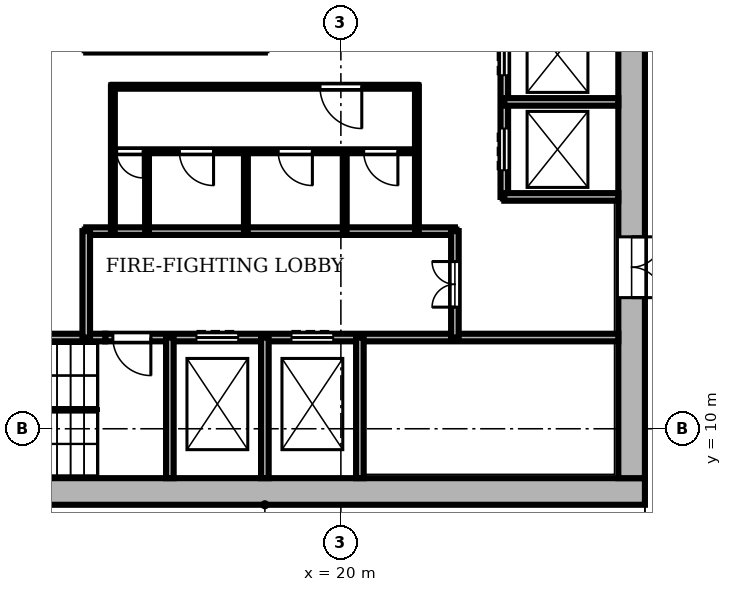
"""IFC4 building model, lengths in metres.
Left out: names, types, materials, properties, quantities, classifications, styles, units other than length and angle.
Written with IfcOpenShell. Run it as: python <this file> out.ifc"""

import sys

from ifc_helpers import new_model, si_unit, direction, frame, frame_2d, origin, place, context, subcontext, project, spatial, rectangle, extrude, element, fill, save


model = new_model("IFC4")
c1 = context("Model", 3, precision=1e-05, world=origin(), true_north=direction((0.0, 1.0)))
c2 = subcontext(c1, "Body", "Model", "MODEL_VIEW")
j1 = project(units=[si_unit("LENGTHUNIT", "METRE"), si_unit("PLANEANGLEUNIT", "RADIAN")], contexts=[c1])
p1 = place(None, origin())
s1 = spatial("IfcSite", under=j1, at=p1, CompositionType="ELEMENT")
p2 = place(p1, origin())
s2 = spatial("IfcBuilding", under=s1, at=p2, CompositionType="ELEMENT")
p3 = place(p2, frame((0.0, 0.0, 126.3)))
s3 = spatial("IfcBuildingStorey", under=s2, at=p3, CompositionType="ELEMENT", Elevation=126.3)
p4 = place(p3, frame((8.0, 8.35, 0.0), z_axis=(0.0, 0.0, 1.0), x_axis=(1.0, 0.0, 0.0)))
e1 = element("IfcWall", 1, at=p4, inside=s3, PredefinedType="SHEAR", context=c2, shape_type="SweptSolid", body=[
    extrude(rectangle(XDim=20.0, YDim=0.7, at=frame_2d((10.0, 0.0))), origin(), (0.0, 0.0, 1.0), 5.4),
])
p5 = place(p3, frame((27.65, 8.7, 0.0), z_axis=(0.0, 0.0, 1.0), x_axis=(0.0, 1.0, 0.0)))
e2 = element("IfcWall", 2, at=p5, inside=s3, PredefinedType="SHEAR", context=c2, shape_type="SweptSolid", body=[
    extrude(rectangle(XDim=18.6, YDim=0.7, at=frame_2d((9.3, 0.0))), origin(), (0.0, 0.0, 1.0), 5.4),
])
p6 = place(p5, frame((4.75, 0.0, 0.0)))
e3 = element("IfcOpeningElement", 3, at=p6, cuts=e2, PredefinedType="OPENING", context=c2, shape_type="SweptSolid", body=[
    extrude(rectangle(XDim=1.6, YDim=2.1, at=frame_2d((0.8, 1.05))), frame((0.0, 0.36, 0.0), z_axis=(0.0, -1.0, 0.0), x_axis=(1.0, 0.0, 0.0)), (0.0, 0.0, 1.0), 0.72),
])
p7 = place(p3, frame((8.7, 12.4, 0.0), z_axis=(0.0, 0.0, 1.0), x_axis=(1.0, 0.0, 0.0)))
e4 = element("IfcWall", 4, at=p7, inside=s3, PredefinedType="SHEAR", context=c2, shape_type="SweptSolid", body=[
    extrude(rectangle(XDim=5.1, YDim=0.2, at=frame_2d((2.55, 0.0))), origin(), (0.0, 0.0, 1.0), 5.08),
])
p8 = place(p3, frame((13.8, 12.4, 0.0), z_axis=(0.0, 0.0, 1.0), x_axis=(1.0, 0.0, 0.0)))
e5 = element("IfcWall", 5, at=p8, inside=s3, PredefinedType="SHEAR", context=c2, shape_type="SweptSolid", body=[
    extrude(rectangle(XDim=13.5, YDim=0.2, at=frame_2d((6.75, 0.0))), origin(), (0.0, 0.0, 1.0), 5.08),
])
p9 = place(p8, frame((2.4, 0.0, 0.0)))
e6 = element("IfcOpeningElement", 6, at=p9, cuts=e5, PredefinedType="OPENING", context=c2, shape_type="SweptSolid", body=[
    extrude(rectangle(XDim=1.1, YDim=2.1, at=frame_2d((0.55, 1.05))), frame((0.0, 0.11, 0.0), z_axis=(0.0, -1.0, 0.0), x_axis=(1.0, 0.0, 0.0)), (0.0, 0.0, 1.0), 0.22),
])
p10 = place(p8, frame((4.9, 0.0, 0.0)))
e7 = element("IfcOpeningElement", 7, at=p10, cuts=e5, PredefinedType="OPENING", context=c2, shape_type="SweptSolid", body=[
    extrude(rectangle(XDim=1.1, YDim=2.1, at=frame_2d((0.55, 1.05))), frame((0.0, 0.11, 0.0), z_axis=(0.0, -1.0, 0.0), x_axis=(1.0, 0.0, 0.0)), (0.0, 0.0, 1.0), 0.22),
])
p11 = place(p8, frame((0.2, 0.0, 0.0)))
e8 = element("IfcOpeningElement", 8, at=p11, cuts=e5, PredefinedType="OPENING", context=c2, shape_type="SweptSolid", body=[
    extrude(rectangle(XDim=1.0, YDim=2.1, at=frame_2d((0.5, 1.05))), frame((0.0, 0.11, 0.0), z_axis=(0.0, -1.0, 0.0), x_axis=(1.0, 0.0, 0.0)), (0.0, 0.0, 1.0), 0.22),
])
p12 = place(p3, frame((13.3, 15.2, 0.0), z_axis=(0.0, 0.0, 1.0), x_axis=(1.0, 0.0, 0.0)))
e9 = element("IfcWall", 9, at=p12, inside=s3, PredefinedType="SHEAR", context=c2, shape_type="SweptSolid", body=[
    extrude(rectangle(XDim=9.7, YDim=0.2, at=frame_2d((4.85, 0.0))), origin(), (0.0, 0.0, 1.0), 5.08),
])
p13 = place(p3, frame((24.3, 16.1, 0.0), z_axis=(0.0, 0.0, 1.0), x_axis=(1.0, 0.0, 0.0)))
e10 = element("IfcWall", 10, at=p13, inside=s3, PredefinedType="SHEAR", context=c2, shape_type="SweptSolid", body=[
    extrude(rectangle(XDim=3.0, YDim=0.2, at=frame_2d((1.5, 0.0))), origin(), (0.0, 0.0, 1.0), 5.08),
])
p14 = place(p3, frame((14.0, 17.3, 0.0), z_axis=(0.0, 0.0, 1.0), x_axis=(1.0, 0.0, 0.0)))
e11 = element("IfcWall", 11, at=p14, inside=s3, PredefinedType="PARTITIONING", context=c2, shape_type="SweptSolid", body=[
    extrude(rectangle(XDim=8.0, YDim=0.1, at=frame_2d((4.0, 0.0))), origin(), (0.0, 0.0, 1.0), 5.08),
])
p15 = place(p14, frame((0.1, 0.0, 0.0)))
e12 = element("IfcOpeningElement", 12, at=p15, cuts=e11, PredefinedType="OPENING", context=c2, shape_type="SweptSolid", body=[
    extrude(rectangle(XDim=0.7, YDim=2.1, at=frame_2d((0.35, 1.05))), frame((0.0, 0.06, 0.0), z_axis=(0.0, -1.0, 0.0), x_axis=(1.0, 0.0, 0.0)), (0.0, 0.0, 1.0), 0.12),
])
p16 = place(p14, frame((1.75, 0.0, 0.0)))
e13 = element("IfcOpeningElement", 13, at=p16, cuts=e11, PredefinedType="OPENING", context=c2, shape_type="SweptSolid", body=[
    extrude(rectangle(XDim=0.9, YDim=2.1, at=frame_2d((0.45, 1.05))), frame((0.0, 0.06, 0.0), z_axis=(0.0, -1.0, 0.0), x_axis=(1.0, 0.0, 0.0)), (0.0, 0.0, 1.0), 0.12),
])
p17 = place(p14, frame((4.35, 0.0, 0.0)))
e14 = element("IfcOpeningElement", 14, at=p17, cuts=e11, PredefinedType="OPENING", context=c2, shape_type="SweptSolid", body=[
    extrude(rectangle(XDim=0.9, YDim=2.1, at=frame_2d((0.45, 1.05))), frame((0.0, 0.06, 0.0), z_axis=(0.0, -1.0, 0.0), x_axis=(1.0, 0.0, 0.0)), (0.0, 0.0, 1.0), 0.12),
])
p18 = place(p14, frame((6.6, 0.0, 0.0)))
e15 = element("IfcOpeningElement", 15, at=p18, cuts=e11, PredefinedType="OPENING", context=c2, shape_type="SweptSolid", body=[
    extrude(rectangle(XDim=0.9, YDim=2.1, at=frame_2d((0.45, 1.05))), frame((0.0, 0.06, 0.0), z_axis=(0.0, -1.0, 0.0), x_axis=(1.0, 0.0, 0.0)), (0.0, 0.0, 1.0), 0.12),
])
p19 = place(p3, frame((24.3, 18.6, 0.0), z_axis=(0.0, 0.0, 1.0), x_axis=(1.0, 0.0, 0.0)))
e16 = element("IfcWall", 16, at=p19, inside=s3, PredefinedType="SHEAR", context=c2, shape_type="SweptSolid", body=[
    extrude(rectangle(XDim=3.0, YDim=0.2, at=frame_2d((1.5, 0.0))), origin(), (0.0, 0.0, 1.0), 5.08),
])
p20 = place(p3, frame((14.0, 19.0, 0.0), z_axis=(0.0, 0.0, 1.0), x_axis=(1.0, 0.0, 0.0)))
e17 = element("IfcWall", 17, at=p20, inside=s3, PredefinedType="PARTITIONING", context=c2, shape_type="SweptSolid", body=[
    extrude(rectangle(XDim=8.0, YDim=0.1, at=frame_2d((4.0, 0.0))), origin(), (0.0, 0.0, 1.0), 5.08),
])
p21 = place(p20, frame((5.45, 0.0, 0.0)))
e18 = element("IfcOpeningElement", 18, at=p21, cuts=e17, PredefinedType="OPENING", context=c2, shape_type="SweptSolid", body=[
    extrude(rectangle(XDim=1.1, YDim=2.1, at=frame_2d((0.55, 1.05))), frame((0.0, 0.06, 0.0), z_axis=(0.0, -1.0, 0.0), x_axis=(1.0, 0.0, 0.0)), (0.0, 0.0, 1.0), 0.12),
])
p22 = place(p3, frame((13.3, 12.4, 0.0), z_axis=(0.0, 0.0, 1.0), x_axis=(0.0, 1.0, 0.0)))
e19 = element("IfcWall", 19, at=p22, inside=s3, PredefinedType="SHEAR", context=c2, shape_type="SweptSolid", body=[
    extrude(rectangle(XDim=2.8, YDim=0.2, at=frame_2d((1.4, 0.0))), origin(), (0.0, 0.0, 1.0), 5.08),
])
p23 = place(p3, frame((14.0, 15.2, 0.0), z_axis=(0.0, 0.0, 1.0), x_axis=(0.0, 1.0, 0.0)))
e20 = element("IfcWall", 20, at=p23, inside=s3, PredefinedType="PARTITIONING", context=c2, shape_type="SweptSolid", body=[
    extrude(rectangle(XDim=3.8, YDim=0.1, at=frame_2d((1.9, 0.0))), origin(), (0.0, 0.0, 1.0), 5.08),
])
p24 = place(p3, frame((14.9, 15.2, 0.0), z_axis=(0.0, 0.0, 1.0), x_axis=(0.0, 1.0, 0.0)))
e21 = element("IfcWall", 21, at=p24, inside=s3, PredefinedType="PARTITIONING", context=c2, shape_type="SweptSolid", body=[
    extrude(rectangle(XDim=2.1, YDim=0.1, at=frame_2d((1.05, 0.0))), origin(), (0.0, 0.0, 1.0), 5.08),
])
p25 = place(p3, frame((15.5, 8.7, 0.0), z_axis=(0.0, 0.0, 1.0), x_axis=(0.0, 1.0, 0.0)))
e22 = element("IfcWall", 22, at=p25, inside=s3, PredefinedType="SHEAR", context=c2, shape_type="SweptSolid", body=[
    extrude(rectangle(XDim=3.7, YDim=0.2, at=frame_2d((1.85, 0.0))), origin(), (0.0, 0.0, 1.0), 5.08),
])
p26 = place(p3, frame((17.5, 15.2, 0.0), z_axis=(0.0, 0.0, 1.0), x_axis=(0.0, 1.0, 0.0)))
e23 = element("IfcWall", 23, at=p26, inside=s3, PredefinedType="PARTITIONING", context=c2, shape_type="SweptSolid", body=[
    extrude(rectangle(XDim=2.1, YDim=0.1, at=frame_2d((1.05, 0.0))), origin(), (0.0, 0.0, 1.0), 5.08),
])
p27 = place(p3, frame((18.0, 8.7, 0.0), z_axis=(0.0, 0.0, 1.0), x_axis=(0.0, 1.0, 0.0)))
e24 = element("IfcWall", 24, at=p27, inside=s3, PredefinedType="SHEAR", context=c2, shape_type="SweptSolid", body=[
    extrude(rectangle(XDim=3.7, YDim=0.2, at=frame_2d((1.85, 0.0))), origin(), (0.0, 0.0, 1.0), 5.08),
])
p28 = place(p3, frame((20.1, 15.2, 0.0), z_axis=(0.0, 0.0, 1.0), x_axis=(0.0, 1.0, 0.0)))
e25 = element("IfcWall", 25, at=p28, inside=s3, PredefinedType="PARTITIONING", context=c2, shape_type="SweptSolid", body=[
    extrude(rectangle(XDim=2.1, YDim=0.1, at=frame_2d((1.05, 0.0))), origin(), (0.0, 0.0, 1.0), 5.08),
])
p29 = place(p3, frame((20.5, 8.7, 0.0), z_axis=(0.0, 0.0, 1.0), x_axis=(0.0, 1.0, 0.0)))
e26 = element("IfcWall", 26, at=p29, inside=s3, PredefinedType="SHEAR", context=c2, shape_type="SweptSolid", body=[
    extrude(rectangle(XDim=3.7, YDim=0.2, at=frame_2d((1.85, 0.0))), origin(), (0.0, 0.0, 1.0), 5.08),
])
p30 = place(p3, frame((22.0, 15.2, 0.0), z_axis=(0.0, 0.0, 1.0), x_axis=(0.0, 1.0, 0.0)))
e27 = element("IfcWall", 27, at=p30, inside=s3, PredefinedType="PARTITIONING", context=c2, shape_type="SweptSolid", body=[
    extrude(rectangle(XDim=3.8, YDim=0.1, at=frame_2d((1.9, 0.0))), origin(), (0.0, 0.0, 1.0), 5.08),
])
p31 = place(p3, frame((23.0, 12.4, 0.0), z_axis=(0.0, 0.0, 1.0), x_axis=(0.0, 1.0, 0.0)))
e28 = element("IfcWall", 28, at=p31, inside=s3, PredefinedType="SHEAR", context=c2, shape_type="SweptSolid", body=[
    extrude(rectangle(XDim=2.8, YDim=0.2, at=frame_2d((1.4, 0.0))), origin(), (0.0, 0.0, 1.0), 5.08),
])
p32 = place(p31, frame((0.8, 0.0, 0.0)))
e29 = element("IfcOpeningElement", 29, at=p32, cuts=e28, PredefinedType="OPENING", context=c2, shape_type="SweptSolid", body=[
    extrude(rectangle(XDim=1.2, YDim=2.1, at=frame_2d((0.6, 1.05))), frame((0.0, 0.11, 0.0), z_axis=(0.0, -1.0, 0.0), x_axis=(1.0, 0.0, 0.0)), (0.0, 0.0, 1.0), 0.22),
])
p33 = place(p3, frame((24.3, 16.1, 0.0), z_axis=(0.0, 0.0, 1.0), x_axis=(0.0, 1.0, 0.0)))
e30 = element("IfcWall", 30, at=p33, inside=s3, PredefinedType="SHEAR", context=c2, shape_type="SweptSolid", body=[
    extrude(rectangle(XDim=7.5, YDim=0.2, at=frame_2d((3.75, 0.0))), origin(), (0.0, 0.0, 1.0), 5.08),
])
p34 = place(p33, frame((0.7, 0.0, 0.0)))
e31 = element("IfcOpeningElement", 31, at=p34, cuts=e30, PredefinedType="OPENING", context=c2, shape_type="SweptSolid", body=[
    extrude(rectangle(XDim=1.1, YDim=2.1, at=frame_2d((0.55, 1.05))), frame((0.0, 0.11, 0.0), z_axis=(0.0, -1.0, 0.0), x_axis=(1.0, 0.0, 0.0)), (0.0, 0.0, 1.0), 0.22),
])
p35 = place(p33, frame((3.2, 0.0, 0.0)))
e32 = element("IfcOpeningElement", 32, at=p35, cuts=e30, PredefinedType="OPENING", context=c2, shape_type="SweptSolid", body=[
    extrude(rectangle(XDim=1.1, YDim=2.1, at=frame_2d((0.55, 1.05))), frame((0.0, 0.11, 0.0), z_axis=(0.0, -1.0, 0.0), x_axis=(1.0, 0.0, 0.0)), (0.0, 0.0, 1.0), 0.22),
])
p36 = place(p33, frame((5.7, 0.0, 0.0)))
e33 = element("IfcOpeningElement", 33, at=p36, cuts=e30, PredefinedType="OPENING", context=c2, shape_type="SweptSolid", body=[
    extrude(rectangle(XDim=1.1, YDim=2.1, at=frame_2d((0.55, 1.05))), frame((0.0, 0.11, 0.0), z_axis=(0.0, -1.0, 0.0), x_axis=(1.0, 0.0, 0.0)), (0.0, 0.0, 1.0), 0.22),
])
p37 = place(p34, origin())
e34 = element("IfcDoor", 34, at=p37, inside=s3, OperationType="DOUBLE_DOOR_SLIDING", PredefinedType="DOOR", context=c2, shape_type="SweptSolid", body=[
    extrude(rectangle(XDim=1.1, YDim=2.1, at=frame_2d((0.55, 1.05))), frame((0.0, 0.025, 0.0), z_axis=(0.0, -1.0, 0.0), x_axis=(1.0, 0.0, 0.0)), (0.0, 0.0, 1.0), 0.05),
])
fill(e31, e34)
p38 = place(p35, origin())
e35 = element("IfcDoor", 35, at=p38, inside=s3, OperationType="DOUBLE_DOOR_SLIDING", PredefinedType="DOOR", context=c2, shape_type="SweptSolid", body=[
    extrude(rectangle(XDim=1.1, YDim=2.1, at=frame_2d((0.55, 1.05))), frame((0.0, 0.025, 0.0), z_axis=(0.0, -1.0, 0.0), x_axis=(1.0, 0.0, 0.0)), (0.0, 0.0, 1.0), 0.05),
])
fill(e32, e35)
p39 = place(p9, origin())
e36 = element("IfcDoor", 36, at=p39, inside=s3, OperationType="DOUBLE_DOOR_SLIDING", PredefinedType="DOOR", context=c2, shape_type="SweptSolid", body=[
    extrude(rectangle(XDim=1.1, YDim=2.1, at=frame_2d((0.55, 1.05))), frame((0.0, 0.025, 0.0), z_axis=(0.0, -1.0, 0.0), x_axis=(1.0, 0.0, 0.0)), (0.0, 0.0, 1.0), 0.05),
])
fill(e6, e36)
p40 = place(p10, origin())
e37 = element("IfcDoor", 37, at=p40, inside=s3, OperationType="DOUBLE_DOOR_SLIDING", PredefinedType="DOOR", context=c2, shape_type="SweptSolid", body=[
    extrude(rectangle(XDim=1.1, YDim=2.1, at=frame_2d((0.55, 1.05))), frame((0.0, 0.025, 0.0), z_axis=(0.0, -1.0, 0.0), x_axis=(1.0, 0.0, 0.0)), (0.0, 0.0, 1.0), 0.05),
])
fill(e7, e37)
p41 = place(p11, frame((1.0, 0.0, 0.0), z_axis=(0.0, 0.0, 1.0), x_axis=(-1.0, 0.0, 0.0)))
e38 = element("IfcDoor", 38, at=p41, inside=s3, OperationType="SINGLE_SWING_LEFT", PredefinedType="DOOR", context=c2, shape_type="SweptSolid", body=[
    extrude(rectangle(XDim=1.0, YDim=2.1, at=frame_2d((0.5, 1.05))), frame((0.0, 0.025, 0.0), z_axis=(0.0, -1.0, 0.0), x_axis=(1.0, 0.0, 0.0)), (0.0, 0.0, 1.0), 0.05),
])
fill(e8, e38)
p42 = place(p32, origin())
e39 = element("IfcDoor", 39, at=p42, inside=s3, OperationType="DOUBLE_DOOR_SINGLE_SWING", PredefinedType="DOOR", context=c2, shape_type="SweptSolid", body=[
    extrude(rectangle(XDim=1.2, YDim=2.1, at=frame_2d((0.6, 1.05))), frame((0.0, 0.025, 0.0), z_axis=(0.0, -1.0, 0.0), x_axis=(1.0, 0.0, 0.0)), (0.0, 0.0, 1.0), 0.05),
])
fill(e29, e39)
p43 = place(p21, frame((1.1, 0.0, 0.0), z_axis=(0.0, 0.0, 1.0), x_axis=(-1.0, 0.0, 0.0)))
e40 = element("IfcDoor", 40, at=p43, inside=s3, OperationType="SINGLE_SWING_LEFT", PredefinedType="DOOR", context=c2, shape_type="SweptSolid", body=[
    extrude(rectangle(XDim=1.1, YDim=2.1, at=frame_2d((0.55, 1.05))), frame((0.0, 0.025, 0.0), z_axis=(0.0, -1.0, 0.0), x_axis=(1.0, 0.0, 0.0)), (0.0, 0.0, 1.0), 0.05),
])
fill(e18, e40)
p44 = place(p15, frame((0.7, 0.0, 0.0), z_axis=(0.0, 0.0, 1.0), x_axis=(-1.0, 0.0, 0.0)))
e41 = element("IfcDoor", 41, at=p44, inside=s3, OperationType="SINGLE_SWING_LEFT", PredefinedType="DOOR", context=c2, shape_type="SweptSolid", body=[
    extrude(rectangle(XDim=0.7, YDim=2.1, at=frame_2d((0.35, 1.05))), frame((0.0, 0.025, 0.0), z_axis=(0.0, -1.0, 0.0), x_axis=(1.0, 0.0, 0.0)), (0.0, 0.0, 1.0), 0.05),
])
fill(e12, e41)
p45 = place(p16, frame((0.9, 0.0, 0.0), z_axis=(0.0, 0.0, 1.0), x_axis=(-1.0, 0.0, 0.0)))
e42 = element("IfcDoor", 42, at=p45, inside=s3, OperationType="SINGLE_SWING_LEFT", PredefinedType="DOOR", context=c2, shape_type="SweptSolid", body=[
    extrude(rectangle(XDim=0.9, YDim=2.1, at=frame_2d((0.45, 1.05))), frame((0.0, 0.025, 0.0), z_axis=(0.0, -1.0, 0.0), x_axis=(1.0, 0.0, 0.0)), (0.0, 0.0, 1.0), 0.05),
])
fill(e13, e42)
p46 = place(p17, frame((0.9, 0.0, 0.0), z_axis=(0.0, 0.0, 1.0), x_axis=(-1.0, 0.0, 0.0)))
e43 = element("IfcDoor", 43, at=p46, inside=s3, OperationType="SINGLE_SWING_LEFT", PredefinedType="DOOR", context=c2, shape_type="SweptSolid", body=[
    extrude(rectangle(XDim=0.9, YDim=2.1, at=frame_2d((0.45, 1.05))), frame((0.0, 0.025, 0.0), z_axis=(0.0, -1.0, 0.0), x_axis=(1.0, 0.0, 0.0)), (0.0, 0.0, 1.0), 0.05),
])
fill(e14, e43)
p47 = place(p18, frame((0.9, 0.0, 0.0), z_axis=(0.0, 0.0, 1.0), x_axis=(-1.0, 0.0, 0.0)))
e44 = element("IfcDoor", 44, at=p47, inside=s3, OperationType="SINGLE_SWING_LEFT", PredefinedType="DOOR", context=c2, shape_type="SweptSolid", body=[
    extrude(rectangle(XDim=0.9, YDim=2.1, at=frame_2d((0.45, 1.05))), frame((0.0, 0.025, 0.0), z_axis=(0.0, -1.0, 0.0), x_axis=(1.0, 0.0, 0.0)), (0.0, 0.0, 1.0), 0.05),
])
fill(e15, e44)
p48 = place(p6, frame((1.6, 0.0, 0.0), z_axis=(0.0, 0.0, 1.0), x_axis=(-1.0, 0.0, 0.0)))
e45 = element("IfcDoor", 45, at=p48, inside=s3, OperationType="DOUBLE_DOOR_SINGLE_SWING", PredefinedType="DOOR", context=c2, shape_type="SweptSolid", body=[
    extrude(rectangle(XDim=1.6, YDim=2.1, at=frame_2d((0.8, 1.05))), frame((0.0, 0.025, 0.0), z_axis=(0.0, -1.0, 0.0), x_axis=(1.0, 0.0, 0.0)), (0.0, 0.0, 1.0), 0.05),
])
fill(e3, e45)
save(model, sys.argv[1])
